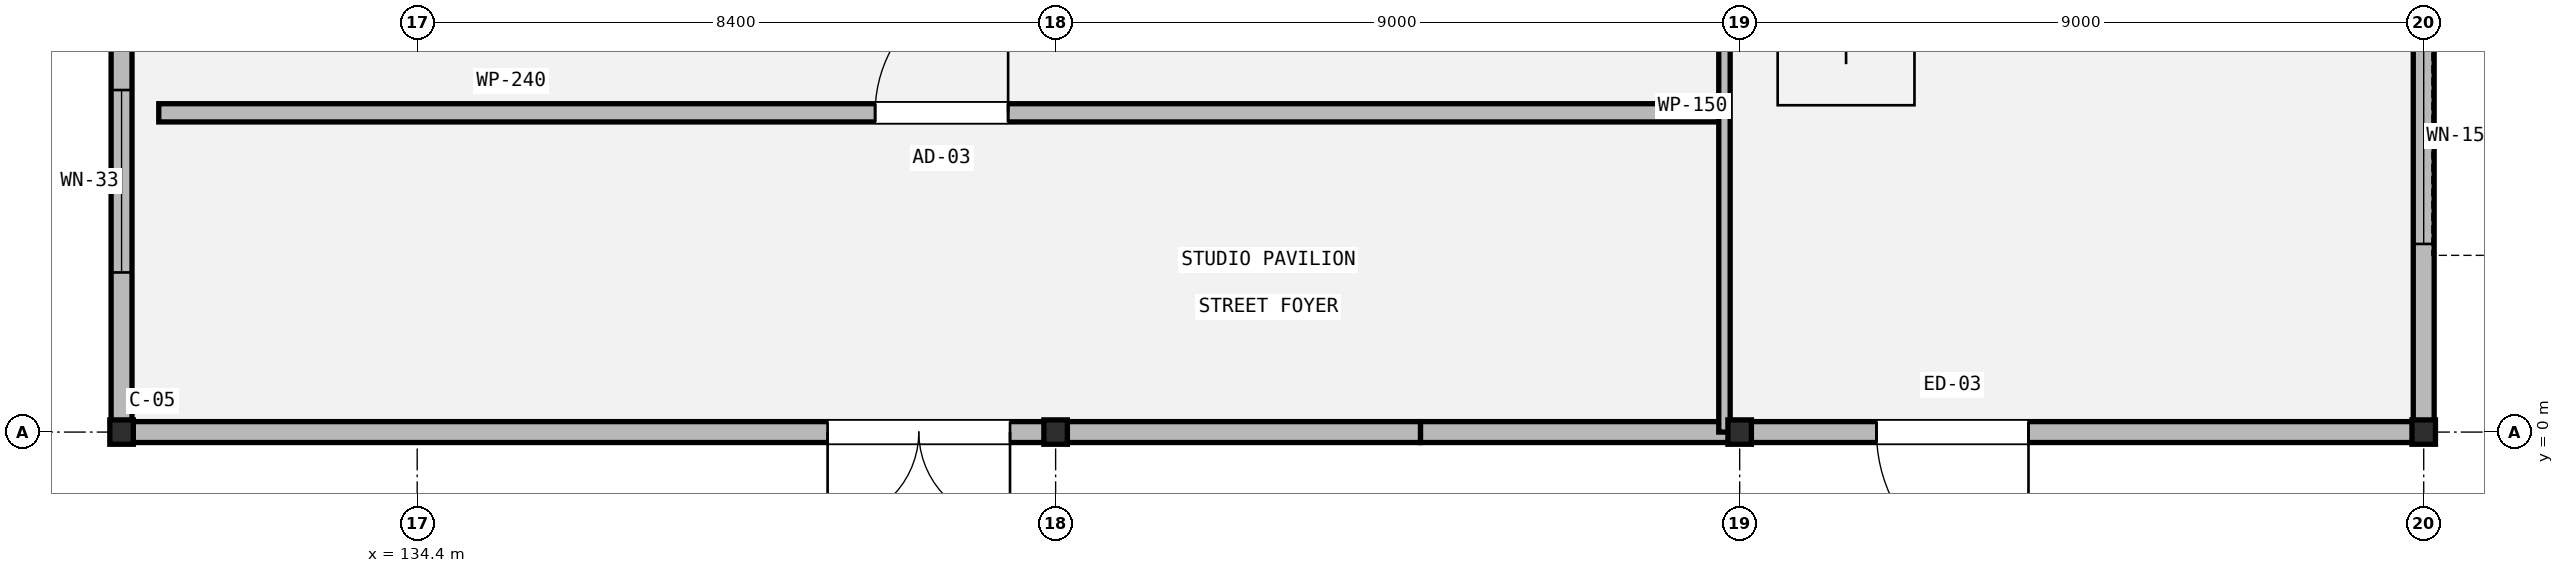
"""IFC4 building model, lengths in metres.
Left out: names, types, materials, properties, quantities, classifications, styles, units other than length and angle.
Written with IfcOpenShell. Run it as: python <this file> out.ifc"""

import sys

from ifc_helpers import new_model, si_unit, direction, frame, frame_2d, origin, origin_2d, place, context, subcontext, project, spatial, rectangle, i_section, extrude, element, fill, save


model = new_model("IFC4")
c1 = context("Model", 3, precision=1e-05, world=origin(), true_north=direction((0.0, 1.0)))
c2 = subcontext(c1, "Body", "Model", "MODEL_VIEW")
j1 = project(units=[si_unit("LENGTHUNIT", "METRE"), si_unit("PLANEANGLEUNIT", "RADIAN")], contexts=[c1])
p1 = place(None, origin())
s1 = spatial("IfcSite", under=j1, at=p1, CompositionType="ELEMENT")
p2 = place(p1, origin())
s2 = spatial("IfcBuilding", under=s1, at=p2, CompositionType="ELEMENT")
p3 = place(p2, origin())
s3 = spatial("IfcBuildingStorey", under=s2, at=p3, CompositionType="ELEMENT", Elevation=0.0)
for number, where, z_axis, x_axis in (
    (1, (130.51, 0.0, 0.0), (0.0, 0.0, 1.0), (1.0, 0.0, 0.0)),
    (2, (142.8, 0.0, 0.0), (0.0, 0.0, 1.0), (1.0, 0.0, 0.0)),
    (3, (151.8, 0.0, 0.0), (0.0, 0.0, 1.0), (1.0, 0.0, 0.0)),
    (4, (160.8, 0.0, 0.0), (0.0, 0.0, 1.0), (1.0, 0.0, 0.0)),
):
    element("IfcColumn", number, at=place(p3, frame(where, z_axis=z_axis, x_axis=x_axis)), inside=s3, PredefinedType="COLUMN", context=c2, shape_type="SweptSolid", body=[
        extrude(i_section(OverallWidth=0.309, OverallDepth=0.321, WebThickness=0.014, FlangeThickness=0.022, FilletRadius=0.015, at=origin_2d()), origin(), (0.0, 0.0, 1.0), 5.4),
    ])
p4 = place(p3, frame((160.8, 0.0, 0.0), z_axis=(0.0, 0.0, 1.0), x_axis=(-1.0, 0.0, 0.0)))
e5 = element("IfcWall", 5, at=p4, inside=s3, PredefinedType="STANDARD", context=c2, shape_type="SweptSolid", body=[
    extrude(rectangle(XDim=13.2, YDim=0.275, at=frame_2d((6.6, 0.0))), origin(), (0.0, 0.0, 1.0), 4.402),
])
p5 = place(p4, frame((5.2, 0.0, 0.0)))
e6 = element("IfcOpeningElement", 6, at=p5, cuts=e5, PredefinedType="OPENING", context=c2, shape_type="SweptSolid", body=[
    extrude(rectangle(XDim=2.0, YDim=2.45, at=frame_2d((1.0, 1.225))), frame((0.0, 0.147, 0.0), z_axis=(0.0, -1.0, 0.0), x_axis=(1.0, 0.0, 0.0)), (0.0, 0.0, 1.0), 0.295),
])
p6 = place(p3, frame((147.6, 0.0, 0.0), z_axis=(0.0, 0.0, 1.0), x_axis=(-1.0, 0.0, 0.0)))
e7 = element("IfcWall", 7, at=p6, inside=s3, PredefinedType="STANDARD", context=c2, shape_type="SweptSolid", body=[
    extrude(rectangle(XDim=17.09, YDim=0.275, at=frame_2d((8.545, 0.0))), origin(), (0.0, 0.0, 1.0), 4.488),
])
p7 = place(p6, frame((5.4, 0.0, 0.0)))
e8 = element("IfcOpeningElement", 8, at=p7, cuts=e7, PredefinedType="OPENING", context=c2, shape_type="SweptSolid", body=[
    extrude(rectangle(XDim=2.4, YDim=2.6, at=frame_2d((1.2, 1.3))), frame((0.0, 0.147, 0.0), z_axis=(0.0, -1.0, 0.0), x_axis=(1.0, 0.0, 0.0)), (0.0, 0.0, 1.0), 0.295),
])
p8 = place(p3, frame((130.51, 0.0, 0.0), z_axis=(0.0, 0.0, 1.0), x_axis=(0.0, 1.0, 0.0)))
e9 = element("IfcWall", 9, at=p8, inside=s3, PredefinedType="STANDARD", context=c2, shape_type="SweptSolid", body=[
    extrude(rectangle(XDim=18.6, YDim=0.275, at=frame_2d((9.3, 0.0))), origin(), (0.0, 0.0, 1.0), 4.488),
])
p9 = place(p8, frame((2.1, 0.0, 0.9)))
e10 = element("IfcOpeningElement", 10, at=p9, cuts=e9, PredefinedType="OPENING", context=c2, shape_type="SweptSolid", body=[
    extrude(rectangle(XDim=2.4, YDim=1.65, at=frame_2d((1.2, 0.825))), frame((0.0, 0.147, 0.0), z_axis=(0.0, -1.0, 0.0), x_axis=(1.0, 0.0, 0.0)), (0.0, 0.0, 1.0), 0.295),
])
p10 = place(p8, frame((13.025, 0.0, 0.9)))
e11 = element("IfcOpeningElement", 11, at=p10, cuts=e9, PredefinedType="OPENING", context=c2, shape_type="SweptSolid", body=[
    extrude(rectangle(XDim=1.85, YDim=2.1, at=frame_2d((0.925, 1.05))), frame((0.0, 0.147, 0.0), z_axis=(0.0, -1.0, 0.0), x_axis=(1.0, 0.0, 0.0)), (0.0, 0.0, 1.0), 0.295),
])
p11 = place(p3, frame((160.8, 15.6, 0.0), z_axis=(0.0, 0.0, 1.0), x_axis=(0.0, -1.0, 0.0)))
e12 = element("IfcWall", 12, at=p11, inside=s3, PredefinedType="STANDARD", context=c2, shape_type="SweptSolid", body=[
    extrude(rectangle(XDim=15.6, YDim=0.275, at=frame_2d((7.8, 0.0))), origin(), (0.0, 0.0, 1.0), 4.488),
])
p12 = place(p11, frame((2.575, 0.0, 0.9)))
e13 = element("IfcOpeningElement", 13, at=p12, cuts=e12, PredefinedType="OPENING", context=c2, shape_type="SweptSolid", body=[
    extrude(rectangle(XDim=2.65, YDim=2.1, at=frame_2d((1.325, 1.05))), frame((0.0, 0.147, 0.0), z_axis=(0.0, -1.0, 0.0), x_axis=(1.0, 0.0, 0.0)), (0.0, 0.0, 1.0), 0.295),
])
p13 = place(p11, frame((10.275, 0.0, 0.9)))
e14 = element("IfcOpeningElement", 14, at=p13, cuts=e12, PredefinedType="OPENING", context=c2, shape_type="SweptSolid", body=[
    extrude(rectangle(XDim=2.85, YDim=2.1, at=frame_2d((1.425, 1.05))), frame((0.0, 0.147, 0.0), z_axis=(0.0, -1.0, 0.0), x_axis=(1.0, 0.0, 0.0)), (0.0, 0.0, 1.0), 0.295),
])
p14 = place(p3, frame((131.0, 4.2, 0.0), z_axis=(0.0, 0.0, 1.0), x_axis=(1.0, 0.0, 0.0)))
e15 = element("IfcWall", 15, at=p14, inside=s3, PredefinedType="PARTITIONING", context=c2, shape_type="SweptSolid", body=[
    extrude(rectangle(XDim=20.6, YDim=0.24, at=frame_2d((10.3, 0.0))), origin(), (0.0, 0.0, 1.0), 4.402),
])
p15 = place(p14, frame((9.425, 0.0, 0.0)))
e16 = element("IfcOpeningElement", 16, at=p15, cuts=e15, PredefinedType="OPENING", context=c2, shape_type="SweptSolid", body=[
    extrude(rectangle(XDim=1.75, YDim=2.3, at=frame_2d((0.875, 1.15))), frame((0.0, 0.13, 0.0), z_axis=(0.0, -1.0, 0.0), x_axis=(1.0, 0.0, 0.0)), (0.0, 0.0, 1.0), 0.26),
])
p16 = place(p3, frame((151.6, 0.0, 0.0), z_axis=(0.0, 0.0, 1.0), x_axis=(0.0, 1.0, 0.0)))
e17 = element("IfcWall", 17, at=p16, inside=s3, PredefinedType="PARTITIONING", context=c2, shape_type="SweptSolid", body=[
    extrude(rectangle(XDim=15.6, YDim=0.15, at=frame_2d((7.8, 0.0))), origin(), (0.0, 0.0, 1.0), 4.402),
])
p17 = place(p16, frame((8.724, 0.0, 0.0)))
e18 = element("IfcOpeningElement", 18, at=p17, cuts=e17, PredefinedType="OPENING", context=c2, shape_type="SweptSolid", body=[
    extrude(rectangle(XDim=1.06, YDim=2.1, at=frame_2d((0.53, 1.05))), frame((0.0, 0.085, 0.0), z_axis=(0.0, -1.0, 0.0), x_axis=(1.0, 0.0, 0.0)), (0.0, 0.0, 1.0), 0.17),
])
p18 = place(p5, origin())
e19 = element("IfcDoor", 19, at=p18, inside=s3, OperationType="SINGLE_SWING_LEFT", PredefinedType="DOOR", context=c2, shape_type="SweptSolid", body=[
    extrude(rectangle(XDim=2.0, YDim=2.45, at=frame_2d((1.0, 1.225))), frame((0.0, 0.025, 0.0), z_axis=(0.0, -1.0, 0.0), x_axis=(1.0, 0.0, 0.0)), (0.0, 0.0, 1.0), 0.05),
])
fill(e6, e19)
p19 = place(p7, origin())
e20 = element("IfcDoor", 20, at=p19, inside=s3, OperationType="DOUBLE_SWING_RIGHT", PredefinedType="DOOR", context=c2, shape_type="SweptSolid", body=[
    extrude(rectangle(XDim=2.4, YDim=2.6, at=frame_2d((1.2, 1.3))), frame((0.0, 0.025, 0.0), z_axis=(0.0, -1.0, 0.0), x_axis=(1.0, 0.0, 0.0)), (0.0, 0.0, 1.0), 0.05),
])
fill(e8, e20)
p20 = place(p9, origin())
e21 = element("IfcWindow", 21, at=p20, inside=s3, PartitioningType="SINGLE_PANEL", PredefinedType="WINDOW", context=c2, shape_type="SweptSolid", body=[
    extrude(rectangle(XDim=2.4, YDim=1.65, at=frame_2d((1.2, 0.825))), frame((0.0, 0.03, 0.0), z_axis=(0.0, -1.0, 0.0), x_axis=(1.0, 0.0, 0.0)), (0.0, 0.0, 1.0), 0.06),
])
fill(e10, e21)
p21 = place(p13, origin())
e22 = element("IfcWindow", 22, at=p21, inside=s3, PartitioningType="SINGLE_PANEL", PredefinedType="WINDOW", context=c2, shape_type="SweptSolid", body=[
    extrude(rectangle(XDim=2.85, YDim=2.1, at=frame_2d((1.425, 1.05))), frame((0.0, 0.03, 0.0), z_axis=(0.0, -1.0, 0.0), x_axis=(1.0, 0.0, 0.0)), (0.0, 0.0, 1.0), 0.06),
])
fill(e14, e22)
p22 = place(p15, origin())
e23 = element("IfcDoor", 23, at=p22, inside=s3, OperationType="SINGLE_SWING_RIGHT", PredefinedType="DOOR", context=c2, shape_type="SweptSolid", body=[
    extrude(rectangle(XDim=1.75, YDim=2.3, at=frame_2d((0.875, 1.15))), frame((0.0, 0.025, 0.0), z_axis=(0.0, -1.0, 0.0), x_axis=(1.0, 0.0, 0.0)), (0.0, 0.0, 1.0), 0.05),
])
fill(e16, e23)
save(model, sys.argv[1])
